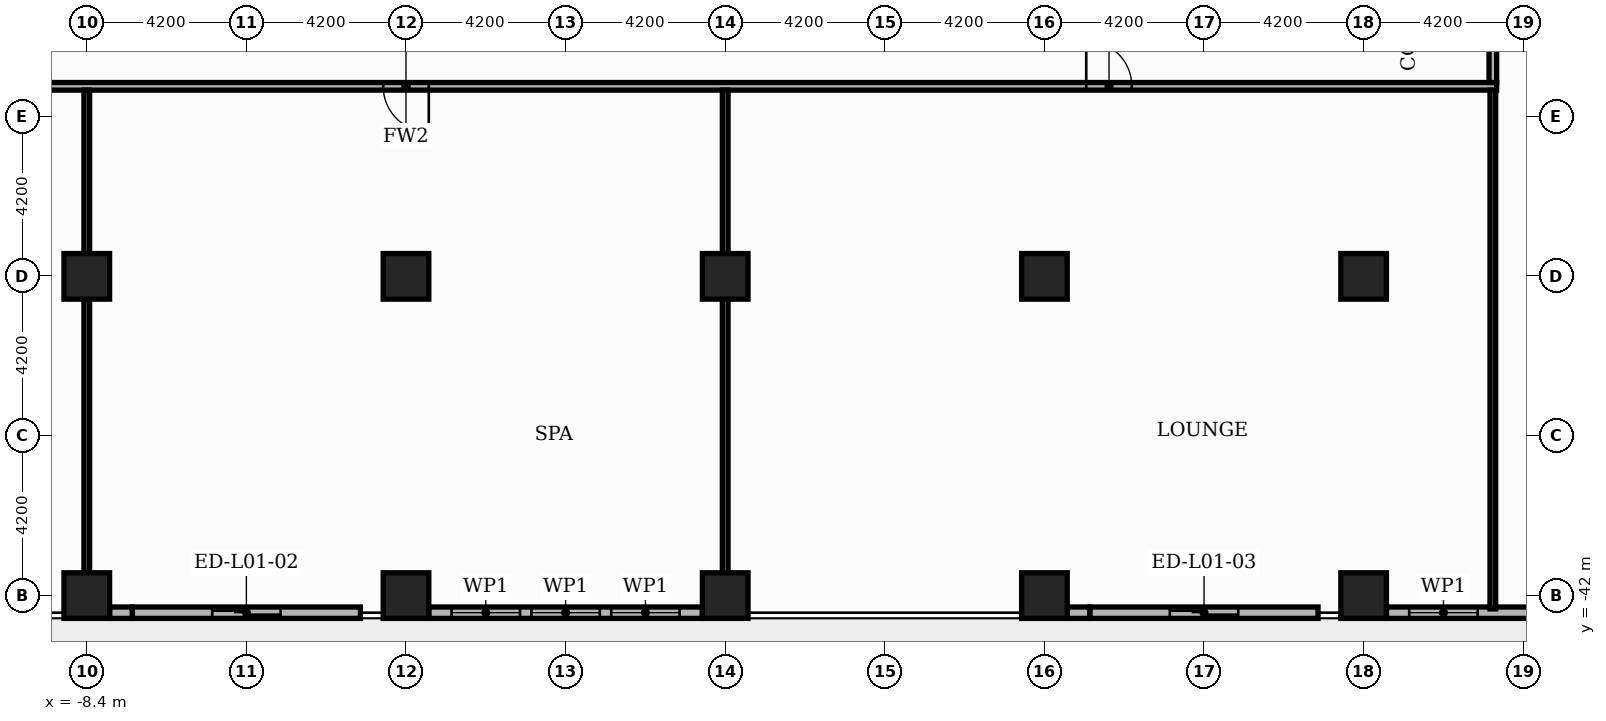
"""IFC4 building model, lengths in metres.
Left out: names, types, materials, properties, quantities, classifications, styles, units other than length and angle.
Written with IfcOpenShell. Run it as: python <this file> out.ifc"""

import sys

from ifc_helpers import new_model, si_unit, direction, frame, frame_2d, origin, origin_2d, place, context, subcontext, project, spatial, rectangle, extrude, element, fill, save


model = new_model("IFC4")
c1 = context("Model", 3, precision=1e-05, world=origin(), true_north=direction((0.0, 1.0)))
c2 = subcontext(c1, "Body", "Model", "MODEL_VIEW")
j1 = project(units=[si_unit("LENGTHUNIT", "METRE"), si_unit("PLANEANGLEUNIT", "RADIAN")], contexts=[c1])
p1 = place(None, origin())
s1 = spatial("IfcSite", under=j1, at=p1, CompositionType="ELEMENT")
p2 = place(p1, origin())
s2 = spatial("IfcBuilding", under=s1, at=p2, CompositionType="ELEMENT")
p3 = place(p2, frame((0.0, 0.0, 7.2)))
s3 = spatial("IfcBuildingStorey", under=s2, at=p3, CompositionType="ELEMENT", Elevation=7.2)
for number, where, z_axis, x_axis in (
    (1, (0.0, -33.6, 0.0), (0.0, 0.0, 1.0), (1.0, 0.0, 0.0)),
    (2, (0.0, -42.0, 0.0), (0.0, 0.0, 1.0), (1.0, 0.0, 0.0)),
    (3, (8.4, -33.6, 0.0), (0.0, 0.0, 1.0), (1.0, 0.0, 0.0)),
    (4, (8.4, -42.0, 0.0), (0.0, 0.0, 1.0), (1.0, 0.0, 0.0)),
    (5, (16.8, -33.6, 0.0), (0.0, 0.0, 1.0), (1.0, 0.0, 0.0)),
    (6, (16.8, -42.0, 0.0), (0.0, 0.0, 1.0), (1.0, 0.0, 0.0)),
    (7, (25.2, -33.6, 0.0), (0.0, 0.0, 1.0), (1.0, 0.0, 0.0)),
    (8, (25.2, -42.0, 0.0), (0.0, 0.0, 1.0), (1.0, 0.0, 0.0)),
    (9, (-8.4, -33.6, 0.0), (0.0, 0.0, 1.0), (1.0, 0.0, 0.0)),
    (10, (-8.4, -42.0, 0.0), (0.0, 0.0, 1.0), (1.0, 0.0, 0.0)),
):
    element("IfcColumn", number, at=place(p3, frame(where, z_axis=z_axis, x_axis=x_axis)), inside=s3, PredefinedType="COLUMN", context=c2, shape_type="SweptSolid", body=[
        extrude(rectangle(XDim=1.2, YDim=1.2, at=origin_2d()), origin(), (0.0, 0.0, 1.0), 4.8),
    ])
p4 = place(p3, frame((-7.8, -42.45, 0.0), z_axis=(0.0, 0.0, 1.0), x_axis=(1.0, 0.0, 0.0)))
e11 = element("IfcWall", 11, at=p4, inside=s3, PredefinedType="STANDARD", context=c2, shape_type="SweptSolid", body=[
    extrude(rectangle(XDim=0.6, YDim=0.3, at=frame_2d((0.3, 0.0))), origin(), (0.0, 0.0, 1.0), 4.38),
])
p5 = place(p3, frame((-7.2, -42.45, 0.0), z_axis=(0.0, 0.0, 1.0), x_axis=(1.0, 0.0, 0.0)))
e12 = element("IfcWall", 12, at=p5, inside=s3, PredefinedType="STANDARD", context=c2, shape_type="SweptSolid", body=[
    extrude(rectangle(XDim=6.0, YDim=0.3, at=frame_2d((3.0, 0.0))), origin(), (0.0, 0.0, 1.0), 4.38),
])
p6 = place(p5, frame((2.1, 0.0, 0.0)))
e13 = element("IfcOpeningElement", 13, at=p6, cuts=e12, PredefinedType="OPENING", context=c2, shape_type="SweptSolid", body=[
    extrude(rectangle(XDim=1.8, YDim=2.4, at=frame_2d((0.9, 1.2))), frame((0.0, 0.16, 0.0), z_axis=(0.0, -1.0, 0.0), x_axis=(1.0, 0.0, 0.0)), (0.0, 0.0, 1.0), 0.32),
])
p7 = place(p3, frame((0.6, -42.45, 0.0), z_axis=(0.0, 0.0, 1.0), x_axis=(1.0, 0.0, 0.0)))
e14 = element("IfcWall", 14, at=p7, inside=s3, PredefinedType="STANDARD", context=c2, shape_type="SweptSolid", body=[
    extrude(rectangle(XDim=7.2, YDim=0.3, at=frame_2d((3.6, 0.0))), origin(), (0.0, 0.0, 1.0), 4.38),
])
p8 = place(p7, frame((0.6, 0.0, 0.6)))
e15 = element("IfcOpeningElement", 15, at=p8, cuts=e14, PredefinedType="OPENING", context=c2, shape_type="SweptSolid", body=[
    extrude(rectangle(XDim=1.8, YDim=3.0, at=frame_2d((0.9, 1.5))), frame((0.0, 0.16, 0.0), z_axis=(0.0, -1.0, 0.0), x_axis=(1.0, 0.0, 0.0)), (0.0, 0.0, 1.0), 0.32),
])
p9 = place(p7, frame((2.7, 0.0, 0.6)))
e16 = element("IfcOpeningElement", 16, at=p9, cuts=e14, PredefinedType="OPENING", context=c2, shape_type="SweptSolid", body=[
    extrude(rectangle(XDim=1.8, YDim=3.0, at=frame_2d((0.9, 1.5))), frame((0.0, 0.16, 0.0), z_axis=(0.0, -1.0, 0.0), x_axis=(1.0, 0.0, 0.0)), (0.0, 0.0, 1.0), 0.32),
])
p10 = place(p7, frame((4.8, 0.0, 0.6)))
e17 = element("IfcOpeningElement", 17, at=p10, cuts=e14, PredefinedType="OPENING", context=c2, shape_type="SweptSolid", body=[
    extrude(rectangle(XDim=1.8, YDim=3.0, at=frame_2d((0.9, 1.5))), frame((0.0, 0.16, 0.0), z_axis=(0.0, -1.0, 0.0), x_axis=(1.0, 0.0, 0.0)), (0.0, 0.0, 1.0), 0.32),
])
p11 = place(p3, frame((17.4, -42.45, 0.0), z_axis=(0.0, 0.0, 1.0), x_axis=(1.0, 0.0, 0.0)))
e18 = element("IfcWall", 18, at=p11, inside=s3, PredefinedType="STANDARD", context=c2, shape_type="SweptSolid", body=[
    extrude(rectangle(XDim=0.6, YDim=0.3, at=frame_2d((0.3, 0.0))), origin(), (0.0, 0.0, 1.0), 4.38),
])
p12 = place(p3, frame((18.0, -42.45, 0.0), z_axis=(0.0, 0.0, 1.0), x_axis=(1.0, 0.0, 0.0)))
e19 = element("IfcWall", 19, at=p12, inside=s3, PredefinedType="STANDARD", context=c2, shape_type="SweptSolid", body=[
    extrude(rectangle(XDim=6.0, YDim=0.3, at=frame_2d((3.0, 0.0))), origin(), (0.0, 0.0, 1.0), 4.38),
])
p13 = place(p12, frame((2.1, 0.0, 0.0)))
e20 = element("IfcOpeningElement", 20, at=p13, cuts=e19, PredefinedType="OPENING", context=c2, shape_type="SweptSolid", body=[
    extrude(rectangle(XDim=1.8, YDim=2.4, at=frame_2d((0.9, 1.2))), frame((0.0, 0.16, 0.0), z_axis=(0.0, -1.0, 0.0), x_axis=(1.0, 0.0, 0.0)), (0.0, 0.0, 1.0), 0.32),
])
p14 = place(p3, frame((25.8, -42.45, 0.0), z_axis=(0.0, 0.0, 1.0), x_axis=(1.0, 0.0, 0.0)))
e21 = element("IfcWall", 21, at=p14, inside=s3, PredefinedType="STANDARD", context=c2, shape_type="SweptSolid", body=[
    extrude(rectangle(XDim=7.2, YDim=0.3, at=frame_2d((3.6, 0.0))), origin(), (0.0, 0.0, 1.0), 4.38),
])
p15 = place(p14, frame((0.6, 0.0, 0.6)))
e22 = element("IfcOpeningElement", 22, at=p15, cuts=e21, PredefinedType="OPENING", context=c2, shape_type="SweptSolid", body=[
    extrude(rectangle(XDim=1.8, YDim=3.0, at=frame_2d((0.9, 1.5))), frame((0.0, 0.16, 0.0), z_axis=(0.0, -1.0, 0.0), x_axis=(1.0, 0.0, 0.0)), (0.0, 0.0, 1.0), 0.32),
])
p16 = place(p14, frame((4.8, 0.0, 0.6)))
e23 = element("IfcOpeningElement", 23, at=p16, cuts=e21, PredefinedType="OPENING", context=c2, shape_type="SweptSolid", body=[
    extrude(rectangle(XDim=1.8, YDim=3.0, at=frame_2d((0.9, 1.5))), frame((0.0, 0.16, 0.0), z_axis=(0.0, -1.0, 0.0), x_axis=(1.0, 0.0, 0.0)), (0.0, 0.0, 1.0), 0.32),
])
p17 = place(p3, frame((-28.7, -28.6, 0.0), z_axis=(0.0, 0.0, 1.0), x_axis=(1.0, 0.0, 0.0)))
e24 = element("IfcWall", 24, at=p17, inside=s3, PredefinedType="PARTITIONING", context=c2, shape_type="SweptSolid", body=[
    extrude(rectangle(XDim=57.4, YDim=0.2, at=frame_2d((28.7, 0.0))), origin(), (0.0, 0.0, 1.0), 3.98),
])
p18 = place(p17, frame((9.6, 0.0, 0.0)))
e25 = element("IfcOpeningElement", 25, at=p18, cuts=e24, PredefinedType="OPENING", context=c2, shape_type="SweptSolid", body=[
    extrude(rectangle(XDim=1.2, YDim=2.2, at=frame_2d((0.6, 1.1))), frame((0.0, 0.11, 0.0), z_axis=(0.0, -1.0, 0.0), x_axis=(1.0, 0.0, 0.0)), (0.0, 0.0, 1.0), 0.22),
])
p19 = place(p17, frame((28.1, 0.0, 0.0)))
e26 = element("IfcOpeningElement", 26, at=p19, cuts=e24, PredefinedType="OPENING", context=c2, shape_type="SweptSolid", body=[
    extrude(rectangle(XDim=1.2, YDim=2.2, at=frame_2d((0.6, 1.1))), frame((0.0, 0.11, 0.0), z_axis=(0.0, -1.0, 0.0), x_axis=(1.0, 0.0, 0.0)), (0.0, 0.0, 1.0), 0.22),
])
p20 = place(p17, frame((46.6, 0.0, 0.0)))
e27 = element("IfcOpeningElement", 27, at=p20, cuts=e24, PredefinedType="OPENING", context=c2, shape_type="SweptSolid", body=[
    extrude(rectangle(XDim=1.2, YDim=2.2, at=frame_2d((0.6, 1.1))), frame((0.0, 0.11, 0.0), z_axis=(0.0, -1.0, 0.0), x_axis=(1.0, 0.0, 0.0)), (0.0, 0.0, 1.0), 0.22),
])
p21 = place(p3, frame((-8.4, -41.4, 0.0), z_axis=(0.0, 0.0, 1.0), x_axis=(0.0, 1.0, 0.0)))
e28 = element("IfcWall", 28, at=p21, inside=s3, PredefinedType="PARTITIONING", context=c2, shape_type="SweptSolid", body=[
    extrude(rectangle(XDim=7.2, YDim=0.15, at=frame_2d((3.6, 0.0))), origin(), (0.0, 0.0, 1.0), 3.98),
])
p22 = place(p3, frame((-8.4, -33.0, 0.0), z_axis=(0.0, 0.0, 1.0), x_axis=(0.0, 1.0, 0.0)))
e29 = element("IfcWall", 29, at=p22, inside=s3, PredefinedType="PARTITIONING", context=c2, shape_type="SweptSolid", body=[
    extrude(rectangle(XDim=4.3, YDim=0.15, at=frame_2d((2.15, 0.0))), origin(), (0.0, 0.0, 1.0), 3.98),
])
p23 = place(p3, frame((8.4, -41.4, 0.0), z_axis=(0.0, 0.0, 1.0), x_axis=(0.0, 1.0, 0.0)))
e30 = element("IfcWall", 30, at=p23, inside=s3, PredefinedType="PARTITIONING", context=c2, shape_type="SweptSolid", body=[
    extrude(rectangle(XDim=7.2, YDim=0.15, at=frame_2d((3.6, 0.0))), origin(), (0.0, 0.0, 1.0), 3.98),
])
p24 = place(p3, frame((8.4, -33.0, 0.0), z_axis=(0.0, 0.0, 1.0), x_axis=(0.0, 1.0, 0.0)))
e31 = element("IfcWall", 31, at=p24, inside=s3, PredefinedType="PARTITIONING", context=c2, shape_type="SweptSolid", body=[
    extrude(rectangle(XDim=4.3, YDim=0.15, at=frame_2d((2.15, 0.0))), origin(), (0.0, 0.0, 1.0), 3.98),
])
p25 = place(p3, frame((28.6, -42.35, 0.0), z_axis=(0.0, 0.0, 1.0), x_axis=(0.0, 1.0, 0.0)))
e32 = element("IfcWall", 32, at=p25, inside=s3, PredefinedType="PARTITIONING", context=c2, shape_type="SweptSolid", body=[
    extrude(rectangle(XDim=13.65, YDim=0.15, at=frame_2d((6.825, 0.0))), origin(), (0.0, 0.0, 1.0), 4.08),
])
p26 = place(p3, frame((28.6, -28.5, 0.0), z_axis=(0.0, 0.0, 1.0), x_axis=(0.0, 1.0, 0.0)))
e33 = element("IfcWall", 33, at=p26, inside=s3, PredefinedType="PARTITIONING", context=c2, shape_type="SweptSolid", body=[
    extrude(rectangle(XDim=3.8, YDim=0.2, at=frame_2d((1.9, 0.0))), origin(), (0.0, 0.0, 1.0), 4.08),
])
p27 = place(p26, frame((1.3, 0.0, 0.0)))
e34 = element("IfcOpeningElement", 34, at=p27, cuts=e33, PredefinedType="OPENING", context=c2, shape_type="SweptSolid", body=[
    extrude(rectangle(XDim=1.2, YDim=2.2, at=frame_2d((0.6, 1.1))), frame((0.0, 0.11, 0.0), z_axis=(0.0, -1.0, 0.0), x_axis=(1.0, 0.0, 0.0)), (0.0, 0.0, 1.0), 0.22),
])
p28 = place(p6, origin())
e35 = element("IfcDoor", 35, at=p28, inside=s3, OperationType="SLIDING_TO_LEFT", PredefinedType="DOOR", context=c2, shape_type="SweptSolid", body=[
    extrude(rectangle(XDim=1.8, YDim=2.4, at=frame_2d((0.9, 1.2))), frame((0.0, 0.025, 0.0), z_axis=(0.0, -1.0, 0.0), x_axis=(1.0, 0.0, 0.0)), (0.0, 0.0, 1.0), 0.05),
])
fill(e13, e35)
p29 = place(p8, origin())
e36 = element("IfcWindow", 36, at=p29, inside=s3, PartitioningType="SINGLE_PANEL", PredefinedType="WINDOW", context=c2, shape_type="SweptSolid", body=[
    extrude(rectangle(XDim=1.8, YDim=3.0, at=frame_2d((0.9, 1.5))), frame((0.0, 0.03, 0.0), z_axis=(0.0, -1.0, 0.0), x_axis=(1.0, 0.0, 0.0)), (0.0, 0.0, 1.0), 0.06),
])
fill(e15, e36)
p30 = place(p9, origin())
e37 = element("IfcWindow", 37, at=p30, inside=s3, PartitioningType="SINGLE_PANEL", PredefinedType="WINDOW", context=c2, shape_type="SweptSolid", body=[
    extrude(rectangle(XDim=1.8, YDim=3.0, at=frame_2d((0.9, 1.5))), frame((0.0, 0.03, 0.0), z_axis=(0.0, -1.0, 0.0), x_axis=(1.0, 0.0, 0.0)), (0.0, 0.0, 1.0), 0.06),
])
fill(e16, e37)
p31 = place(p10, origin())
e38 = element("IfcWindow", 38, at=p31, inside=s3, PartitioningType="SINGLE_PANEL", PredefinedType="WINDOW", context=c2, shape_type="SweptSolid", body=[
    extrude(rectangle(XDim=1.8, YDim=3.0, at=frame_2d((0.9, 1.5))), frame((0.0, 0.03, 0.0), z_axis=(0.0, -1.0, 0.0), x_axis=(1.0, 0.0, 0.0)), (0.0, 0.0, 1.0), 0.06),
])
fill(e17, e38)
p32 = place(p13, origin())
e39 = element("IfcDoor", 39, at=p32, inside=s3, OperationType="SLIDING_TO_LEFT", PredefinedType="DOOR", context=c2, shape_type="SweptSolid", body=[
    extrude(rectangle(XDim=1.8, YDim=2.4, at=frame_2d((0.9, 1.2))), frame((0.0, 0.025, 0.0), z_axis=(0.0, -1.0, 0.0), x_axis=(1.0, 0.0, 0.0)), (0.0, 0.0, 1.0), 0.05),
])
fill(e20, e39)
p33 = place(p15, origin())
e40 = element("IfcWindow", 40, at=p33, inside=s3, PartitioningType="SINGLE_PANEL", PredefinedType="WINDOW", context=c2, shape_type="SweptSolid", body=[
    extrude(rectangle(XDim=1.8, YDim=3.0, at=frame_2d((0.9, 1.5))), frame((0.0, 0.03, 0.0), z_axis=(0.0, -1.0, 0.0), x_axis=(1.0, 0.0, 0.0)), (0.0, 0.0, 1.0), 0.06),
])
fill(e22, e40)
p34 = place(p19, origin())
e41 = element("IfcDoor", 41, at=p34, inside=s3, OperationType="SINGLE_SWING_RIGHT", PredefinedType="DOOR", context=c2, shape_type="SweptSolid", body=[
    extrude(rectangle(XDim=1.2, YDim=2.2, at=frame_2d((0.6, 1.1))), frame((0.0, 0.025, 0.0), z_axis=(0.0, -1.0, 0.0), x_axis=(1.0, 0.0, 0.0)), (0.0, 0.0, 1.0), 0.05),
])
fill(e26, e41)
p35 = place(p20, origin())
e42 = element("IfcDoor", 42, at=p35, inside=s3, OperationType="SINGLE_SWING_LEFT", PredefinedType="DOOR", context=c2, shape_type="SweptSolid", body=[
    extrude(rectangle(XDim=1.2, YDim=2.2, at=frame_2d((0.6, 1.1))), frame((0.0, 0.025, 0.0), z_axis=(0.0, -1.0, 0.0), x_axis=(1.0, 0.0, 0.0)), (0.0, 0.0, 1.0), 0.05),
])
fill(e27, e42)
save(model, sys.argv[1])
